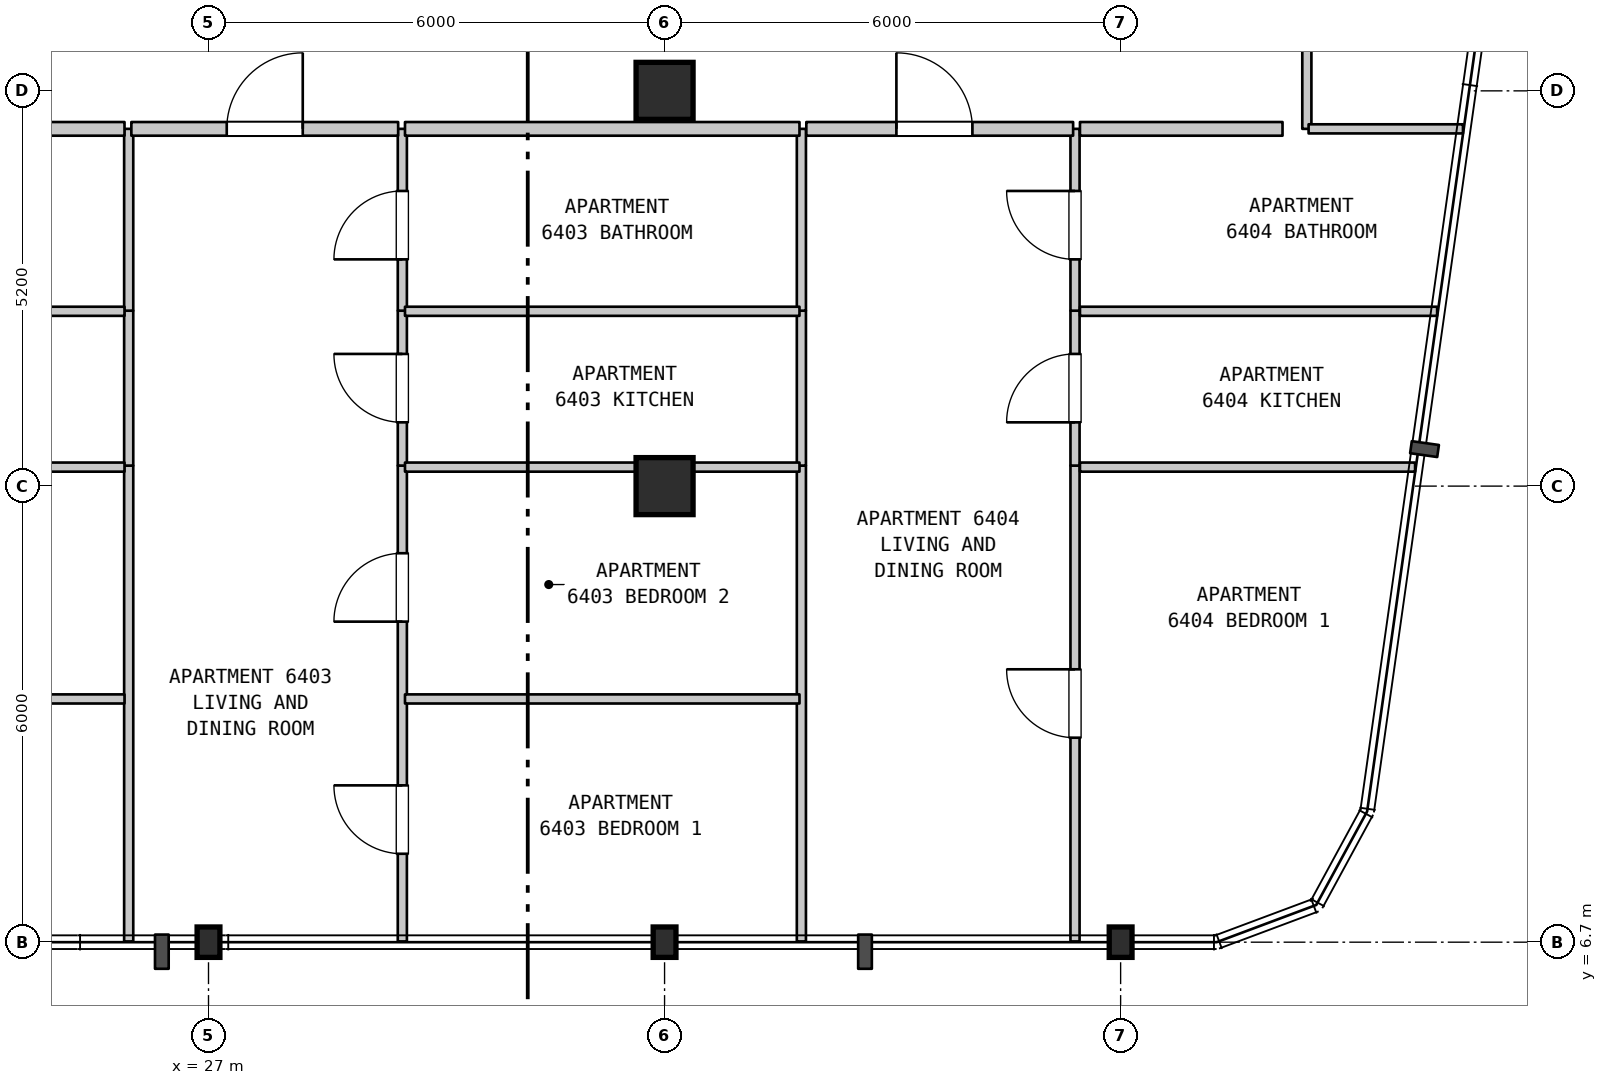
"""IFC4 building model, lengths in metres.
Left out: names, types, materials, properties, quantities, classifications, styles, units other than length and angle.
Written with IfcOpenShell. Run it as: python <this file> out.ifc"""

import sys

from ifc_helpers import new_model, si_unit, direction, frame, frame_2d, origin, origin_2d, place, context, subcontext, project, spatial, rectangle, i_section, extrude, element, fill, save


model = new_model("IFC4")
c1 = context("Model", 3, precision=1e-05, world=origin(), true_north=direction((0.0, 1.0)))
c2 = subcontext(c1, "Body", "Model", "MODEL_VIEW")
j1 = project(units=[si_unit("LENGTHUNIT", "METRE"), si_unit("PLANEANGLEUNIT", "RADIAN")], contexts=[c1])
p1 = place(None, origin())
s1 = spatial("IfcSite", under=j1, at=p1, CompositionType="ELEMENT")
p2 = place(p1, origin())
s2 = spatial("IfcBuilding", under=s1, at=p2, CompositionType="ELEMENT")
p3 = place(p2, frame((0.0, 0.0, 258.4)))
s3 = spatial("IfcBuildingStorey", under=s2, at=p3, CompositionType="ELEMENT", Elevation=258.4)
for number, where, z_axis, x_axis in (
    (1, (27.0, 6.7, 0.0), (0.0, 0.0, 1.0), (1.0, 0.0, 0.0)),
    (2, (33.0, 6.7, 0.0), (0.0, 0.0, 1.0), (1.0, 0.0, 0.0)),
):
    element("IfcColumn", number, at=place(p3, frame(where, z_axis=z_axis, x_axis=x_axis)), inside=s3, PredefinedType="COLUMN", context=c2, shape_type="SweptSolid", body=[
        extrude(i_section(OverallWidth=0.3, OverallDepth=0.4, WebThickness=0.013, FlangeThickness=0.024, FilletRadius=0.027, at=origin_2d()), origin(), (0.0, 0.0, 1.0), 3.7),
    ])
for number, where, z_axis, x_axis in (
    (3, (33.0, 12.7, 0.0), (0.0, 0.0, 1.0), (1.0, 0.0, 0.0)),
    (4, (33.0, 17.9, 0.0), (0.0, 0.0, 1.0), (1.0, 0.0, 0.0)),
):
    element("IfcColumn", number, at=place(p3, frame(where, z_axis=z_axis, x_axis=x_axis)), inside=s3, PredefinedType="COLUMN", context=c2, shape_type="SweptSolid", body=[
        extrude(rectangle(XDim=0.75, YDim=0.75, at=origin_2d()), origin(), (0.0, 0.0, 1.0), 3.7),
    ])
p4 = place(p3, frame((39.0, 6.7, 0.0), z_axis=(0.0, 0.0, 1.0), x_axis=(1.0, 0.0, 0.0)))
e5 = element("IfcColumn", 5, at=p4, inside=s3, PredefinedType="COLUMN", context=c2, shape_type="SweptSolid", body=[
    extrude(i_section(OverallWidth=0.3, OverallDepth=0.4, WebThickness=0.013, FlangeThickness=0.024, FilletRadius=0.027, at=origin_2d()), origin(), (0.0, 0.0, 1.0), 3.7),
])
p5 = place(p3, frame((25.95, 6.71, 0.0), z_axis=(0.0, 0.0, 1.0), x_axis=(0.0, 1.0, 0.0)))
e6 = element("IfcWall", 6, at=p5, inside=s3, PredefinedType="PARTITIONING", context=c2, shape_type="SweptSolid", body=[
    extrude(rectangle(XDim=6.26, YDim=0.12, at=frame_2d((3.13, 0.0))), origin(), (0.0, 0.0, 1.0), 3.39),
])
p6 = place(p3, frame((25.95, 12.97, 0.0), z_axis=(0.0, 0.0, 1.0), x_axis=(0.0, 1.0, 0.0)))
e7 = element("IfcWall", 7, at=p6, inside=s3, PredefinedType="PARTITIONING", context=c2, shape_type="SweptSolid", body=[
    extrude(rectangle(XDim=2.038, YDim=0.12, at=frame_2d((1.019, 0.0))), origin(), (0.0, 0.0, 1.0), 3.39),
])
p7 = place(p3, frame((25.95, 15.008, 0.0), z_axis=(0.0, 0.0, 1.0), x_axis=(0.0, 1.0, 0.0)))
e8 = element("IfcWall", 8, at=p7, inside=s3, PredefinedType="PARTITIONING", context=c2, shape_type="SweptSolid", body=[
    extrude(rectangle(XDim=2.392, YDim=0.12, at=frame_2d((1.196, 0.0))), origin(), (0.0, 0.0, 1.0), 3.39),
])
p8 = place(p3, frame((29.55, 6.71, 0.0), z_axis=(0.0, 0.0, 1.0), x_axis=(0.0, 1.0, 0.0)))
e9 = element("IfcWall", 9, at=p8, inside=s3, PredefinedType="PARTITIONING", context=c2, shape_type="SweptSolid", body=[
    extrude(rectangle(XDim=6.26, YDim=0.12, at=frame_2d((3.13, 0.0))), origin(), (0.0, 0.0, 1.0), 3.39),
])
p9 = place(p8, frame((1.153, 0.0, 0.0)))
e10 = element("IfcOpeningElement", 10, at=p9, cuts=e9, PredefinedType="OPENING", context=c2, shape_type="SweptSolid", body=[
    extrude(rectangle(XDim=0.9, YDim=2.15, at=frame_2d((0.45, 1.075))), frame((0.0, 0.07, 0.0), z_axis=(0.0, -1.0, 0.0), x_axis=(1.0, 0.0, 0.0)), (0.0, 0.0, 1.0), 0.14),
])
p10 = place(p8, frame((4.207, 0.0, 0.0)))
e11 = element("IfcOpeningElement", 11, at=p10, cuts=e9, PredefinedType="OPENING", context=c2, shape_type="SweptSolid", body=[
    extrude(rectangle(XDim=0.9, YDim=2.15, at=frame_2d((0.45, 1.075))), frame((0.0, 0.07, 0.0), z_axis=(0.0, -1.0, 0.0), x_axis=(1.0, 0.0, 0.0)), (0.0, 0.0, 1.0), 0.14),
])
p11 = place(p3, frame((29.55, 12.97, 0.0), z_axis=(0.0, 0.0, 1.0), x_axis=(0.0, 1.0, 0.0)))
e12 = element("IfcWall", 12, at=p11, inside=s3, PredefinedType="PARTITIONING", context=c2, shape_type="SweptSolid", body=[
    extrude(rectangle(XDim=2.038, YDim=0.12, at=frame_2d((1.019, 0.0))), origin(), (0.0, 0.0, 1.0), 3.39),
])
p12 = place(p11, frame((0.569, 0.0, 0.0)))
e13 = element("IfcOpeningElement", 13, at=p12, cuts=e12, PredefinedType="OPENING", context=c2, shape_type="SweptSolid", body=[
    extrude(rectangle(XDim=0.9, YDim=2.15, at=frame_2d((0.45, 1.075))), frame((0.0, 0.07, 0.0), z_axis=(0.0, -1.0, 0.0), x_axis=(1.0, 0.0, 0.0)), (0.0, 0.0, 1.0), 0.14),
])
p13 = place(p3, frame((29.55, 15.008, 0.0), z_axis=(0.0, 0.0, 1.0), x_axis=(0.0, 1.0, 0.0)))
e14 = element("IfcWall", 14, at=p13, inside=s3, PredefinedType="PARTITIONING", context=c2, shape_type="SweptSolid", body=[
    extrude(rectangle(XDim=2.392, YDim=0.12, at=frame_2d((1.196, 0.0))), origin(), (0.0, 0.0, 1.0), 3.39),
])
p14 = place(p13, frame((0.675, 0.0, 0.0)))
e15 = element("IfcOpeningElement", 15, at=p14, cuts=e14, PredefinedType="OPENING", context=c2, shape_type="SweptSolid", body=[
    extrude(rectangle(XDim=0.9, YDim=2.1, at=frame_2d((0.45, 1.05))), frame((0.0, 0.07, 0.0), z_axis=(0.0, -1.0, 0.0), x_axis=(1.0, 0.0, 0.0)), (0.0, 0.0, 1.0), 0.14),
])
p15 = place(p3, frame((34.8, 6.71, 0.0), z_axis=(0.0, 0.0, 1.0), x_axis=(0.0, 1.0, 0.0)))
e16 = element("IfcWall", 16, at=p15, inside=s3, PredefinedType="PARTITIONING", context=c2, shape_type="SweptSolid", body=[
    extrude(rectangle(XDim=6.26, YDim=0.12, at=frame_2d((3.13, 0.0))), origin(), (0.0, 0.0, 1.0), 3.39),
])
p16 = place(p3, frame((34.8, 12.97, 0.0), z_axis=(0.0, 0.0, 1.0), x_axis=(0.0, 1.0, 0.0)))
e17 = element("IfcWall", 17, at=p16, inside=s3, PredefinedType="PARTITIONING", context=c2, shape_type="SweptSolid", body=[
    extrude(rectangle(XDim=2.038, YDim=0.12, at=frame_2d((1.019, 0.0))), origin(), (0.0, 0.0, 1.0), 3.39),
])
p17 = place(p3, frame((34.8, 15.008, 0.0), z_axis=(0.0, 0.0, 1.0), x_axis=(0.0, 1.0, 0.0)))
e18 = element("IfcWall", 18, at=p17, inside=s3, PredefinedType="PARTITIONING", context=c2, shape_type="SweptSolid", body=[
    extrude(rectangle(XDim=2.392, YDim=0.12, at=frame_2d((1.196, 0.0))), origin(), (0.0, 0.0, 1.0), 3.39),
])
p18 = place(p3, frame((38.4, 6.71, 0.0), z_axis=(0.0, 0.0, 1.0), x_axis=(0.0, 1.0, 0.0)))
e19 = element("IfcWall", 19, at=p18, inside=s3, PredefinedType="PARTITIONING", context=c2, shape_type="SweptSolid", body=[
    extrude(rectangle(XDim=6.26, YDim=0.12, at=frame_2d((3.13, 0.0))), origin(), (0.0, 0.0, 1.0), 3.39),
])
p19 = place(p18, frame((2.68, 0.0, 0.0)))
e20 = element("IfcOpeningElement", 20, at=p19, cuts=e19, PredefinedType="OPENING", context=c2, shape_type="SweptSolid", body=[
    extrude(rectangle(XDim=0.9, YDim=2.15, at=frame_2d((0.45, 1.075))), frame((0.0, 0.07, 0.0), z_axis=(0.0, -1.0, 0.0), x_axis=(1.0, 0.0, 0.0)), (0.0, 0.0, 1.0), 0.14),
])
p20 = place(p3, frame((38.4, 12.97, 0.0), z_axis=(0.0, 0.0, 1.0), x_axis=(0.0, 1.0, 0.0)))
e21 = element("IfcWall", 21, at=p20, inside=s3, PredefinedType="PARTITIONING", context=c2, shape_type="SweptSolid", body=[
    extrude(rectangle(XDim=2.038, YDim=0.12, at=frame_2d((1.019, 0.0))), origin(), (0.0, 0.0, 1.0), 3.39),
])
p21 = place(p20, frame((0.569, 0.0, 0.0)))
e22 = element("IfcOpeningElement", 22, at=p21, cuts=e21, PredefinedType="OPENING", context=c2, shape_type="SweptSolid", body=[
    extrude(rectangle(XDim=0.9, YDim=2.15, at=frame_2d((0.45, 1.075))), frame((0.0, 0.07, 0.0), z_axis=(0.0, -1.0, 0.0), x_axis=(1.0, 0.0, 0.0)), (0.0, 0.0, 1.0), 0.14),
])
p22 = place(p3, frame((38.4, 15.008, 0.0), z_axis=(0.0, 0.0, 1.0), x_axis=(0.0, 1.0, 0.0)))
e23 = element("IfcWall", 23, at=p22, inside=s3, PredefinedType="PARTITIONING", context=c2, shape_type="SweptSolid", body=[
    extrude(rectangle(XDim=2.392, YDim=0.12, at=frame_2d((1.196, 0.0))), origin(), (0.0, 0.0, 1.0), 3.39),
])
p23 = place(p22, frame((0.675, 0.0, 0.0)))
e24 = element("IfcOpeningElement", 24, at=p23, cuts=e23, PredefinedType="OPENING", context=c2, shape_type="SweptSolid", body=[
    extrude(rectangle(XDim=0.9, YDim=2.1, at=frame_2d((0.45, 1.05))), frame((0.0, 0.07, 0.0), z_axis=(0.0, -1.0, 0.0), x_axis=(1.0, 0.0, 0.0)), (0.0, 0.0, 1.0), 0.14),
])
p24 = place(p3, frame((41.45, 17.4, 0.0), z_axis=(0.0, 0.0, 1.0), x_axis=(0.0, 1.0, 0.0)))
e25 = element("IfcWall", 25, at=p24, inside=s3, PredefinedType="PARTITIONING", context=c2, shape_type="SweptSolid", body=[
    extrude(rectangle(XDim=2.099, YDim=0.12, at=frame_2d((1.05, 0.0))), origin(), (0.0, 0.0, 1.0), 3.39),
])
p25 = place(p3, frame((21.045, 9.9, 0.0), z_axis=(0.0, 0.0, 1.0), x_axis=(1.0, 0.0, 0.0)))
e26 = element("IfcWall", 26, at=p25, inside=s3, PredefinedType="PARTITIONING", context=c2, shape_type="SweptSolid", body=[
    extrude(rectangle(XDim=4.85, YDim=0.12, at=frame_2d((2.425, 0.0))), origin(), (0.0, 0.0, 1.0), 3.39),
])
p26 = place(p3, frame((29.585, 9.9, 0.0), z_axis=(0.0, 0.0, 1.0), x_axis=(1.0, 0.0, 0.0)))
e27 = element("IfcWall", 27, at=p26, inside=s3, PredefinedType="PARTITIONING", context=c2, shape_type="SweptSolid", body=[
    extrude(rectangle(XDim=5.19, YDim=0.12, at=frame_2d((2.595, 0.0))), origin(), (0.0, 0.0, 1.0), 3.39),
])
p27 = place(p3, frame((21.045, 12.95, 0.0), z_axis=(0.0, 0.0, 1.0), x_axis=(1.0, 0.0, 0.0)))
e28 = element("IfcWall", 28, at=p27, inside=s3, PredefinedType="PARTITIONING", context=c2, shape_type="SweptSolid", body=[
    extrude(rectangle(XDim=4.85, YDim=0.12, at=frame_2d((2.425, 0.0))), origin(), (0.0, 0.0, 1.0), 3.39),
])
p28 = place(p3, frame((29.585, 12.95, 0.0), z_axis=(0.0, 0.0, 1.0), x_axis=(1.0, 0.0, 0.0)))
e29 = element("IfcWall", 29, at=p28, inside=s3, PredefinedType="PARTITIONING", context=c2, shape_type="SweptSolid", body=[
    extrude(rectangle(XDim=5.19, YDim=0.12, at=frame_2d((2.595, 0.0))), origin(), (0.0, 0.0, 1.0), 3.39),
])
p29 = place(p3, frame((38.465, 12.95, 0.0), z_axis=(0.0, 0.0, 1.0), x_axis=(1.0, 0.0, 0.0)))
e30 = element("IfcWall", 30, at=p29, inside=s3, PredefinedType="PARTITIONING", context=c2, shape_type="SweptSolid", body=[
    extrude(rectangle(XDim=4.409, YDim=0.12, at=frame_2d((2.205, 0.0))), origin(), (0.0, 0.0, 1.0), 3.39),
])
p30 = place(p3, frame((21.045, 15.0, 0.0), z_axis=(0.0, 0.0, 1.0), x_axis=(1.0, 0.0, 0.0)))
e31 = element("IfcWall", 31, at=p30, inside=s3, PredefinedType="PARTITIONING", context=c2, shape_type="SweptSolid", body=[
    extrude(rectangle(XDim=4.85, YDim=0.12, at=frame_2d((2.425, 0.0))), origin(), (0.0, 0.0, 1.0), 3.39),
])
p31 = place(p3, frame((29.585, 15.0, 0.0), z_axis=(0.0, 0.0, 1.0), x_axis=(1.0, 0.0, 0.0)))
e32 = element("IfcWall", 32, at=p31, inside=s3, PredefinedType="PARTITIONING", context=c2, shape_type="SweptSolid", body=[
    extrude(rectangle(XDim=5.19, YDim=0.12, at=frame_2d((2.595, 0.0))), origin(), (0.0, 0.0, 1.0), 3.39),
])
p32 = place(p3, frame((38.465, 15.0, 0.0), z_axis=(0.0, 0.0, 1.0), x_axis=(1.0, 0.0, 0.0)))
e33 = element("IfcWall", 33, at=p32, inside=s3, PredefinedType="PARTITIONING", context=c2, shape_type="SweptSolid", body=[
    extrude(rectangle(XDim=4.699, YDim=0.12, at=frame_2d((2.35, 0.0))), origin(), (0.0, 0.0, 1.0), 3.39),
])
p33 = place(p3, frame((21.045, 17.4, 0.0), z_axis=(0.0, 0.0, 1.0), x_axis=(1.0, 0.0, 0.0)))
e34 = element("IfcWall", 34, at=p33, inside=s3, PredefinedType="STANDARD", context=c2, shape_type="SweptSolid", body=[
    extrude(rectangle(XDim=4.85, YDim=0.18, at=frame_2d((2.425, 0.0))), origin(), (0.0, 0.0, 1.0), 3.39),
])
p34 = place(p3, frame((25.985, 17.4, 0.0), z_axis=(0.0, 0.0, 1.0), x_axis=(1.0, 0.0, 0.0)))
e35 = element("IfcWall", 35, at=p34, inside=s3, PredefinedType="STANDARD", context=c2, shape_type="SweptSolid", body=[
    extrude(rectangle(XDim=3.51, YDim=0.18, at=frame_2d((1.755, 0.0))), origin(), (0.0, 0.0, 1.0), 3.39),
])
p35 = place(p34, frame((1.255, 0.0, 0.0)))
e36 = element("IfcOpeningElement", 36, at=p35, cuts=e35, PredefinedType="OPENING", context=c2, shape_type="SweptSolid", body=[
    extrude(rectangle(XDim=1.0, YDim=2.15, at=frame_2d((0.5, 1.075))), frame((0.0, 0.1, 0.0), z_axis=(0.0, -1.0, 0.0), x_axis=(1.0, 0.0, 0.0)), (0.0, 0.0, 1.0), 0.2),
])
p36 = place(p3, frame((29.585, 17.4, 0.0), z_axis=(0.0, 0.0, 1.0), x_axis=(1.0, 0.0, 0.0)))
e37 = element("IfcWall", 37, at=p36, inside=s3, PredefinedType="STANDARD", context=c2, shape_type="SweptSolid", body=[
    extrude(rectangle(XDim=5.19, YDim=0.18, at=frame_2d((2.595, 0.0))), origin(), (0.0, 0.0, 1.0), 3.39),
])
p37 = place(p3, frame((34.865, 17.4, 0.0), z_axis=(0.0, 0.0, 1.0), x_axis=(1.0, 0.0, 0.0)))
e38 = element("IfcWall", 38, at=p37, inside=s3, PredefinedType="STANDARD", context=c2, shape_type="SweptSolid", body=[
    extrude(rectangle(XDim=3.51, YDim=0.18, at=frame_2d((1.755, 0.0))), origin(), (0.0, 0.0, 1.0), 3.39),
])
p38 = place(p37, frame((1.185, 0.0, 0.0)))
e39 = element("IfcOpeningElement", 39, at=p38, cuts=e38, PredefinedType="OPENING", context=c2, shape_type="SweptSolid", body=[
    extrude(rectangle(XDim=1.0, YDim=2.15, at=frame_2d((0.5, 1.075))), frame((0.0, 0.1, 0.0), z_axis=(0.0, -1.0, 0.0), x_axis=(1.0, 0.0, 0.0)), (0.0, 0.0, 1.0), 0.2),
])
p39 = place(p3, frame((38.465, 17.4, 0.0), z_axis=(0.0, 0.0, 1.0), x_axis=(1.0, 0.0, 0.0)))
e40 = element("IfcWall", 40, at=p39, inside=s3, PredefinedType="STANDARD", context=c2, shape_type="SweptSolid", body=[
    extrude(rectangle(XDim=2.665, YDim=0.18, at=frame_2d((1.333, 0.0))), origin(), (0.0, 0.0, 1.0), 3.39),
])
p40 = place(p3, frame((41.473, 17.4, 0.0), z_axis=(0.0, 0.0, 1.0), x_axis=(1.0, 0.0, 0.0)))
e41 = element("IfcWall", 41, at=p40, inside=s3, PredefinedType="PARTITIONING", context=c2, shape_type="SweptSolid", body=[
    extrude(rectangle(XDim=2.031, YDim=0.12, at=frame_2d((1.016, 0.0))), origin(), (0.0, 0.0, 1.0), 3.39),
])
p41 = place(p9, origin())
e42 = element("IfcDoor", 42, at=p41, inside=s3, OperationType="SINGLE_SWING_RIGHT", PredefinedType="DOOR", context=c2, shape_type="SweptSolid", body=[
    extrude(rectangle(XDim=0.9, YDim=2.15, at=frame_2d((0.45, 1.075))), frame((0.0, 0.025, 0.0), z_axis=(0.0, -1.0, 0.0), x_axis=(1.0, 0.0, 0.0)), (0.0, 0.0, 1.0), 0.05),
])
fill(e10, e42)
p42 = place(p10, origin())
e43 = element("IfcDoor", 43, at=p42, inside=s3, OperationType="SINGLE_SWING_LEFT", PredefinedType="DOOR", context=c2, shape_type="SweptSolid", body=[
    extrude(rectangle(XDim=0.9, YDim=2.15, at=frame_2d((0.45, 1.075))), frame((0.0, 0.025, 0.0), z_axis=(0.0, -1.0, 0.0), x_axis=(1.0, 0.0, 0.0)), (0.0, 0.0, 1.0), 0.05),
])
fill(e11, e43)
p43 = place(p12, origin())
e44 = element("IfcDoor", 44, at=p43, inside=s3, OperationType="SINGLE_SWING_RIGHT", PredefinedType="DOOR", context=c2, shape_type="SweptSolid", body=[
    extrude(rectangle(XDim=0.9, YDim=2.15, at=frame_2d((0.45, 1.075))), frame((0.0, 0.025, 0.0), z_axis=(0.0, -1.0, 0.0), x_axis=(1.0, 0.0, 0.0)), (0.0, 0.0, 1.0), 0.05),
])
fill(e13, e44)
p44 = place(p14, origin())
e45 = element("IfcDoor", 45, at=p44, inside=s3, OperationType="SINGLE_SWING_LEFT", PredefinedType="DOOR", context=c2, shape_type="SweptSolid", body=[
    extrude(rectangle(XDim=0.9, YDim=2.1, at=frame_2d((0.45, 1.05))), frame((0.0, 0.025, 0.0), z_axis=(0.0, -1.0, 0.0), x_axis=(1.0, 0.0, 0.0)), (0.0, 0.0, 1.0), 0.05),
])
fill(e15, e45)
p45 = place(p19, origin())
e46 = element("IfcDoor", 46, at=p45, inside=s3, OperationType="SINGLE_SWING_RIGHT", PredefinedType="DOOR", context=c2, shape_type="SweptSolid", body=[
    extrude(rectangle(XDim=0.9, YDim=2.15, at=frame_2d((0.45, 1.075))), frame((0.0, 0.025, 0.0), z_axis=(0.0, -1.0, 0.0), x_axis=(1.0, 0.0, 0.0)), (0.0, 0.0, 1.0), 0.05),
])
fill(e20, e46)
p46 = place(p21, origin())
e47 = element("IfcDoor", 47, at=p46, inside=s3, OperationType="SINGLE_SWING_LEFT", PredefinedType="DOOR", context=c2, shape_type="SweptSolid", body=[
    extrude(rectangle(XDim=0.9, YDim=2.15, at=frame_2d((0.45, 1.075))), frame((0.0, 0.025, 0.0), z_axis=(0.0, -1.0, 0.0), x_axis=(1.0, 0.0, 0.0)), (0.0, 0.0, 1.0), 0.05),
])
fill(e22, e47)
p47 = place(p23, origin())
e48 = element("IfcDoor", 48, at=p47, inside=s3, OperationType="SINGLE_SWING_RIGHT", PredefinedType="DOOR", context=c2, shape_type="SweptSolid", body=[
    extrude(rectangle(XDim=0.9, YDim=2.1, at=frame_2d((0.45, 1.05))), frame((0.0, 0.025, 0.0), z_axis=(0.0, -1.0, 0.0), x_axis=(1.0, 0.0, 0.0)), (0.0, 0.0, 1.0), 0.05),
])
fill(e24, e48)
p48 = place(p35, origin())
e49 = element("IfcDoor", 49, at=p48, inside=s3, OperationType="SINGLE_SWING_RIGHT", PredefinedType="DOOR", context=c2, shape_type="SweptSolid", body=[
    extrude(rectangle(XDim=1.0, YDim=2.15, at=frame_2d((0.5, 1.075))), frame((0.0, 0.025, 0.0), z_axis=(0.0, -1.0, 0.0), x_axis=(1.0, 0.0, 0.0)), (0.0, 0.0, 1.0), 0.05),
])
fill(e36, e49)
p49 = place(p38, origin())
e50 = element("IfcDoor", 50, at=p49, inside=s3, OperationType="SINGLE_SWING_LEFT", PredefinedType="DOOR", context=c2, shape_type="SweptSolid", body=[
    extrude(rectangle(XDim=1.0, YDim=2.15, at=frame_2d((0.5, 1.075))), frame((0.0, 0.025, 0.0), z_axis=(0.0, -1.0, 0.0), x_axis=(1.0, 0.0, 0.0)), (0.0, 0.0, 1.0), 0.05),
])
fill(e39, e50)
save(model, sys.argv[1])
